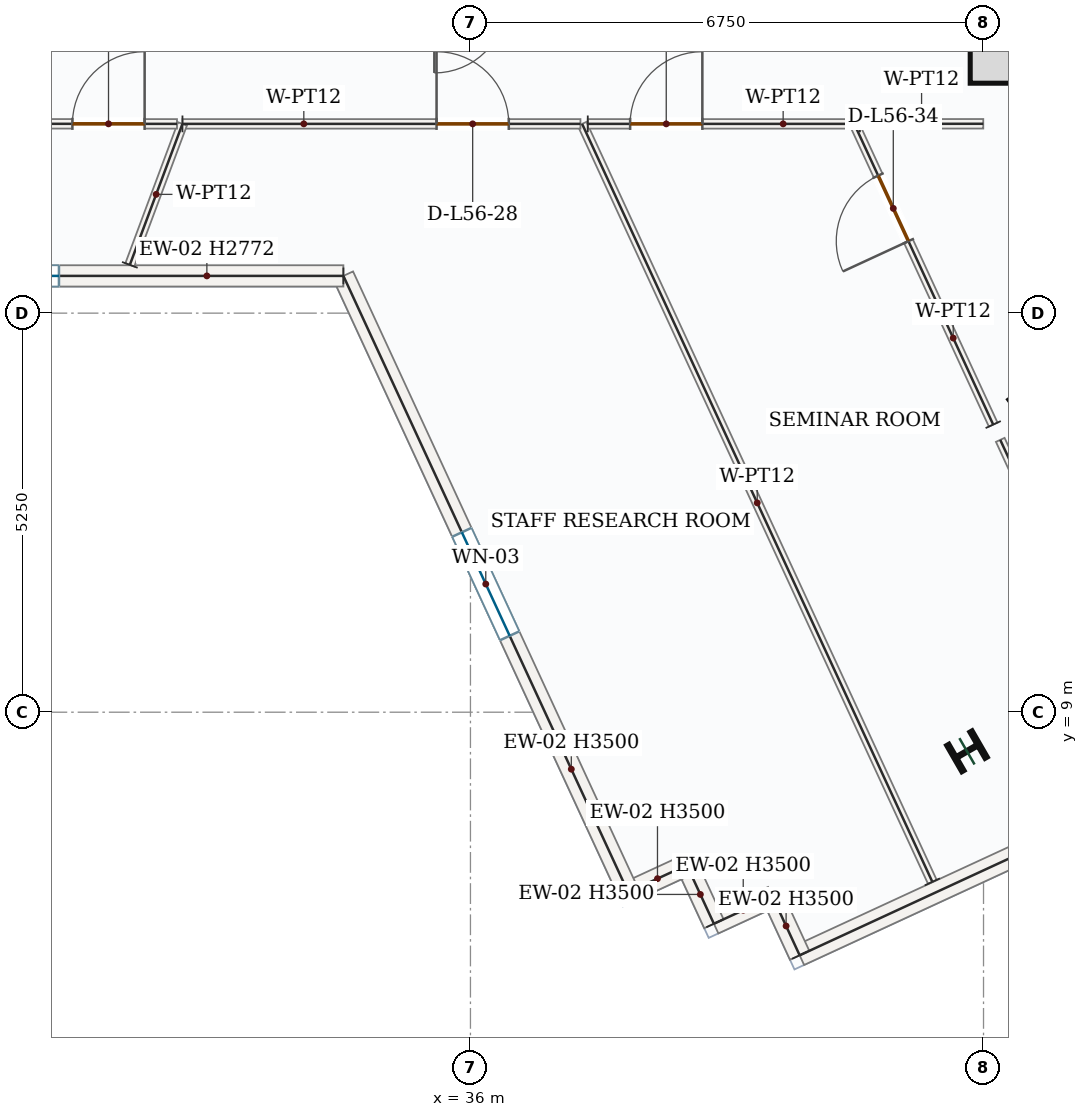
"""IFC4 building model, lengths in metres.
Left out: names, types, materials, properties, quantities, classifications, styles, units other than length and angle.
Written with IfcOpenShell. Run it as: python <this file> out.ifc"""

import sys

from ifc_helpers import new_model, si_unit, direction, frame, frame_2d, origin, origin_2d, place, context, subcontext, project, spatial, rectangle, i_section, extrude, source, transform, mapped, element, fill, save


model = new_model("IFC4")
c1 = context("Model", 3, precision=1e-05, world=origin(), true_north=direction((0.0, 1.0)))
c2 = subcontext(c1, "Body", "Model", "MODEL_VIEW")
j1 = project(units=[si_unit("LENGTHUNIT", "METRE"), si_unit("PLANEANGLEUNIT", "RADIAN")], contexts=[c1])
p1 = place(None, origin())
s1 = spatial("IfcSite", under=j1, at=p1, CompositionType="ELEMENT")
p2 = place(p1, origin())
s2 = spatial("IfcBuilding", under=s1, at=p2, CompositionType="ELEMENT")
p3 = place(p2, frame((0.0, 0.0, 239.1)))
s3 = spatial("IfcBuildingStorey", under=s2, at=p3, CompositionType="ELEMENT", Elevation=239.1)
p4 = place(p3, frame((42.975, 17.4, 0.0), z_axis=(0.0, 0.0, 1.0), x_axis=(0.0, 1.0, 0.0)))
e1 = element("IfcWall", 1, at=p4, inside=s3, PredefinedType="SHEAR", context=c2, shape_type="SweptSolid", body=[
    extrude(rectangle(XDim=8.55, YDim=0.45, at=frame_2d((4.275, 0.0))), origin(), (0.0, 0.0, 1.0), 3.5),
])
p5 = place(p4, frame((6.65, 0.0, 0.0)))
e2 = element("IfcOpeningElement", 2, at=p5, cuts=e1, PredefinedType="OPENING", context=c2, shape_type="SweptSolid", body=[
    extrude(rectangle(XDim=1.1, YDim=2.2, at=frame_2d((0.55, 1.1))), frame((0.0, 0.235, 0.0), z_axis=(0.0, -1.0, 0.0), x_axis=(1.0, 0.0, 0.0)), (0.0, 0.0, 1.0), 0.47),
])
p6 = place(p4, frame((1.75, 0.0, 0.0)))
e3 = element("IfcOpeningElement", 3, at=p6, cuts=e1, PredefinedType="OPENING", context=c2, shape_type="SweptSolid", body=[
    extrude(rectangle(XDim=1.3, YDim=2.2, at=frame_2d((0.65, 1.1))), frame((0.0, 0.235, 0.0), z_axis=(0.0, -1.0, 0.0), x_axis=(1.0, 0.0, 0.0)), (0.0, 0.0, 1.0), 0.47),
])
p7 = place(p4, frame((4.3, 0.0, 0.0)))
e4 = element("IfcOpeningElement", 4, at=p7, cuts=e1, PredefinedType="OPENING", context=c2, shape_type="SweptSolid", body=[
    extrude(rectangle(XDim=0.88, YDim=2.1, at=frame_2d((0.44, 1.05))), frame((0.0, 0.235, 0.0), z_axis=(0.0, -1.0, 0.0), x_axis=(1.0, 0.0, 0.0)), (0.0, 0.0, 1.0), 0.47),
])
m1 = source(origin(), c2, "Body", "SweptSolid", [
    extrude(rectangle(XDim=1.05, YDim=1.05, at=origin_2d()), origin(), (0.0, 0.0, 1.0), 3.75),
])
p8 = place(p3, frame((43.1, 17.8, 0.0), z_axis=(0.0, 0.0, 1.0), x_axis=(1.0, 0.0, 0.0)))
e5 = element("IfcColumn", 5, at=p8, inside=s3, PredefinedType="COLUMN", context=c2, shape_type="MappedRepresentation", body=[
    mapped(m1, transform((0.0, 0.0, 0.0), x_axis=(1.0, 0.0, 0.0), y_axis=(0.0, 1.0, 0.0), z_axis=(0.0, 0.0, 1.0), scale=1.0)),
])
m2 = source(origin(), c2, "Body", "SweptSolid", [
    extrude(i_section(OverallWidth=0.399, OverallDepth=0.386, WebThickness=0.021, FlangeThickness=0.033, FilletRadius=0.018, at=origin_2d()), origin(), (0.0, 0.0, 1.0), 3.75),
])
for number, where, z_axis, x_axis in (
    (6, (43.357, 13.063, 0.0), (0.0, 0.0, 1.0), (-0.588, 0.809, 0.0)),
    (7, (42.532, 8.486, 0.0), (0.0, 0.0, 1.0), (-0.5, 0.866, 0.0)),
):
    element("IfcColumn", number, at=place(p3, frame(where, z_axis=z_axis, x_axis=x_axis)), inside=s3, PredefinedType="COLUMN", context=c2, shape_type="MappedRepresentation", body=[
        mapped(m2, transform((0.0, 0.0, 0.0), x_axis=(1.0, 0.0, 0.0), y_axis=(0.0, 1.0, 0.0), z_axis=(0.0, 0.0, 1.0), scale=1.0)),
    ])
m3 = source(origin(), c2, "Body", "SweptSolid", [
    extrude(rectangle(XDim=9.92, YDim=0.28, at=frame_2d((4.96, 0.0))), origin(), (0.0, 0.0, 1.0), 3.5),
])
p9 = place(p3, frame((49.336, 9.963, 0.0), z_axis=(0.0, 0.0, 1.0), x_axis=(-0.907779940536, -0.419446754143, 0.0)))
e8 = element("IfcWall", 8, at=p9, inside=s3, PredefinedType="SOLIDWALL", context=c2, shape_type="MappedRepresentation", body=[
    mapped(m3, transform((0.0, 0.0, 0.0), x_axis=(1.0, 0.0, 0.0), y_axis=(0.0, 1.0, 0.0), z_axis=(0.0, 0.0, 1.0), scale=1.0)),
])
m4 = source(origin(), c2, "Body", "SweptSolid", [
    extrude(rectangle(XDim=0.85, YDim=0.28, at=frame_2d((0.425, 0.0))), origin(), (0.0, 0.0, 1.0), 3.5),
])
p10 = place(p3, frame((40.331, 5.802, 0.0), z_axis=(0.0, 0.0, 1.0), x_axis=(-0.419422493365, 0.907791150023, 0.0)))
e9 = element("IfcWall", 9, at=p10, inside=s3, PredefinedType="SOLIDWALL", context=c2, shape_type="MappedRepresentation", body=[
    mapped(m4, transform((0.0, 0.0, 0.0), x_axis=(1.0, 0.0, 0.0), y_axis=(0.0, 1.0, 0.0), z_axis=(0.0, 0.0, 1.0), scale=1.0)),
])
m5 = source(origin(), c2, "Body", "SweptSolid", [
    extrude(rectangle(XDim=0.85, YDim=0.28, at=frame_2d((0.425, 0.0))), origin(), (0.0, 0.0, 1.0), 3.5),
])
p11 = place(p3, frame((39.975, 6.573, 0.0), z_axis=(0.0, 0.0, 1.0), x_axis=(-0.907841666427, -0.419313139191, 0.0)))
e10 = element("IfcWall", 10, at=p11, inside=s3, PredefinedType="SOLIDWALL", context=c2, shape_type="MappedRepresentation", body=[
    mapped(m5, transform((0.0, 0.0, 0.0), x_axis=(1.0, 0.0, 0.0), y_axis=(0.0, 1.0, 0.0), z_axis=(0.0, 0.0, 1.0), scale=1.0)),
])
p12 = place(p3, frame((39.203, 6.217, 0.0), z_axis=(0.0, 0.0, 1.0), x_axis=(-0.419422493365, 0.907791150023, 0.0)))
e11 = element("IfcWall", 11, at=p12, inside=s3, PredefinedType="SOLIDWALL", context=c2, shape_type="MappedRepresentation", body=[
    mapped(m4, transform((0.0, 0.0, 0.0), x_axis=(1.0, 0.0, 0.0), y_axis=(0.0, 1.0, 0.0), z_axis=(0.0, 0.0, 1.0), scale=1.0)),
])
p13 = place(p3, frame((38.846, 6.988, 0.0), z_axis=(0.0, 0.0, 1.0), x_axis=(-0.907841666427, -0.419313139191, 0.0)))
e12 = element("IfcWall", 12, at=p13, inside=s3, PredefinedType="SOLIDWALL", context=c2, shape_type="MappedRepresentation", body=[
    mapped(m5, transform((0.0, 0.0, 0.0), x_axis=(1.0, 0.0, 0.0), y_axis=(0.0, 1.0, 0.0), z_axis=(0.0, 0.0, 1.0), scale=1.0)),
])
p14 = place(p3, frame((38.075, 6.632, 0.0), z_axis=(0.0, 0.0, 1.0), x_axis=(-0.419437747849, 0.90778410191, 0.0)))
e13 = element("IfcWall", 13, at=p14, inside=s3, PredefinedType="SOLIDWALL", context=c2, shape_type="SweptSolid", body=[
    extrude(rectangle(XDim=8.932, YDim=0.28, at=frame_2d((4.466, 0.0))), origin(), (0.0, 0.0, 1.0), 3.5),
])
p15 = place(p14, frame((3.716, 0.0, 0.85)))
e14 = element("IfcOpeningElement", 14, at=p15, cuts=e13, PredefinedType="OPENING", context=c2, shape_type="SweptSolid", body=[
    extrude(rectangle(XDim=1.5, YDim=1.5, at=frame_2d((0.75, 0.75))), frame((0.0, 0.15, 0.0), z_axis=(0.0, -1.0, 0.0), x_axis=(1.0, 0.0, 0.0)), (0.0, 0.0, 1.0), 0.3),
])
p16 = place(p3, frame((34.328, 14.74, 0.0), z_axis=(0.0, 0.0, 1.0), x_axis=(-1.0, 0.0, 0.0)))
e15 = element("IfcWall", 15, at=p16, inside=s3, PredefinedType="SOLIDWALL", context=c2, shape_type="SweptSolid", body=[
    extrude(rectangle(XDim=8.984, YDim=0.28, at=frame_2d((4.492, 0.0))), origin(), (0.0, 0.0, 1.0), 2.772),
])
p17 = place(p16, frame((3.742, 0.0, 0.85)))
e16 = element("IfcOpeningElement", 16, at=p17, cuts=e15, PredefinedType="OPENING", context=c2, shape_type="SweptSolid", body=[
    extrude(rectangle(XDim=1.5, YDim=1.5, at=frame_2d((0.75, 0.75))), frame((0.0, 0.15, 0.0), z_axis=(0.0, -1.0, 0.0), x_axis=(1.0, 0.0, 0.0)), (0.0, 0.0, 1.0), 0.3),
])
m6 = source(origin(), c2, "Body", "SweptSolid", [
    extrude(rectangle(XDim=4.904, YDim=0.125, at=frame_2d((2.452, 0.0))), origin(), (0.0, 0.0, 1.0), 3.5),
])
p18 = place(p3, frame((45.027, 8.131, 0.0), z_axis=(0.0, 0.0, 1.0), x_axis=(-0.419459107568, 0.907774232438, 0.0)))
e17 = element("IfcWall", 17, at=p18, inside=s3, PredefinedType="PARTITIONING", context=c2, shape_type="MappedRepresentation", body=[
    mapped(m6, transform((0.0, 0.0, 0.0), x_axis=(1.0, 0.0, 0.0), y_axis=(0.0, 1.0, 0.0), z_axis=(0.0, 0.0, 1.0), scale=1.0)),
])
p19 = place(p3, frame((42.877, 12.784, 0.0), z_axis=(0.0, 0.0, 1.0), x_axis=(-0.419416941906, 0.907793714917, 0.0)))
e18 = element("IfcWall", 18, at=p19, inside=s3, PredefinedType="PARTITIONING", context=c2, shape_type="SweptSolid", body=[
    extrude(rectangle(XDim=4.358, YDim=0.125, at=frame_2d((2.179, 0.0))), origin(), (0.0, 0.0, 1.0), 3.5),
])
p20 = place(p19, frame((2.658, 0.0, 0.0)))
e19 = element("IfcOpeningElement", 19, at=p20, cuts=e18, PredefinedType="OPENING", context=c2, shape_type="SweptSolid", body=[
    extrude(rectangle(XDim=0.95, YDim=2.15, at=frame_2d((0.475, 1.075))), frame((0.0, 0.073, 0.0), z_axis=(0.0, -1.0, 0.0), x_axis=(1.0, 0.0, 0.0)), (0.0, 0.0, 1.0), 0.145),
])
m7 = source(origin(), c2, "Body", "SweptSolid", [
    extrude(rectangle(XDim=1.623, YDim=0.125, at=frame_2d((0.812, 0.0))), origin(), (0.0, 0.0, 1.0), 3.5),
])
p21 = place(p3, frame((41.124, 16.74, 0.0), z_axis=(0.0, 0.0, 1.0), x_axis=(0.999999717168, 0.000752105684, 0.0)))
e20 = element("IfcWall", 20, at=p21, inside=s3, PredefinedType="PARTITIONING", context=c2, shape_type="MappedRepresentation", body=[
    mapped(m7, transform((0.0, 0.0, 0.0), x_axis=(1.0, 0.0, 0.0), y_axis=(0.0, 1.0, 0.0), z_axis=(0.0, 0.0, 1.0), scale=1.0)),
])
m8 = source(origin(), c2, "Body", "SweptSolid", [
    extrude(rectangle(XDim=10.985, YDim=0.125, at=frame_2d((5.492, 0.0))), origin(), (0.0, 0.0, 1.0), 3.5),
])
p22 = place(p3, frame((42.077, 6.768, 0.0), z_axis=(0.0, 0.0, 1.0), x_axis=(-0.41945135704, 0.907777813717, 0.0)))
e21 = element("IfcWall", 21, at=p22, inside=s3, PredefinedType="PARTITIONING", context=c2, shape_type="MappedRepresentation", body=[
    mapped(m8, transform((0.0, 0.0, 0.0), x_axis=(1.0, 0.0, 0.0), y_axis=(0.0, 1.0, 0.0), z_axis=(0.0, 0.0, 1.0), scale=1.0)),
])
p23 = place(p3, frame((37.543, 16.74, 0.0), z_axis=(0.0, 0.0, 1.0), x_axis=(1.0, 0.0, 0.0)))
e22 = element("IfcWall", 22, at=p23, inside=s3, PredefinedType="PARTITIONING", context=c2, shape_type="SweptSolid", body=[
    extrude(rectangle(XDim=3.484, YDim=0.125, at=frame_2d((1.742, 0.0))), origin(), (0.0, 0.0, 1.0), 3.5),
])
p24 = place(p23, frame((0.557, 0.0, 0.0)))
e23 = element("IfcOpeningElement", 23, at=p24, cuts=e22, PredefinedType="OPENING", context=c2, shape_type="SweptSolid", body=[
    extrude(rectangle(XDim=0.95, YDim=2.15, at=frame_2d((0.475, 1.075))), frame((0.0, 0.073, 0.0), z_axis=(0.0, -1.0, 0.0), x_axis=(1.0, 0.0, 0.0)), (0.0, 0.0, 1.0), 0.145),
])
p25 = place(p3, frame((32.211, 16.74, 0.0), z_axis=(0.0, 0.0, 1.0), x_axis=(1.0, 0.0, 0.0)))
e24 = element("IfcWall", 24, at=p25, inside=s3, PredefinedType="PARTITIONING", context=c2, shape_type="SweptSolid", body=[
    extrude(rectangle(XDim=5.236, YDim=0.125, at=frame_2d((2.618, 0.0))), origin(), (0.0, 0.0, 1.0), 3.5),
])
p26 = place(p25, frame((3.343, 0.0, 0.0)))
e25 = element("IfcOpeningElement", 25, at=p26, cuts=e24, PredefinedType="OPENING", context=c2, shape_type="SweptSolid", body=[
    extrude(rectangle(XDim=0.95, YDim=2.15, at=frame_2d((0.475, 1.075))), frame((0.0, 0.073, 0.0), z_axis=(0.0, -1.0, 0.0), x_axis=(1.0, 0.0, 0.0)), (0.0, 0.0, 1.0), 0.145),
])
m9 = source(origin(), c2, "Body", "SweptSolid", [
    extrude(rectangle(XDim=1.98, YDim=0.125, at=frame_2d((0.99, 0.0))), origin(), (0.0, 0.0, 1.0), 3.5),
])
p27 = place(p3, frame((31.519, 14.885, 0.0), z_axis=(0.0, 0.0, 1.0), x_axis=(0.349690675255, 0.9368652153, 0.0)))
e26 = element("IfcWall", 26, at=p27, inside=s3, PredefinedType="PARTITIONING", context=c2, shape_type="MappedRepresentation", body=[
    mapped(m9, transform((0.0, 0.0, 0.0), x_axis=(1.0, 0.0, 0.0), y_axis=(0.0, 1.0, 0.0), z_axis=(0.0, 0.0, 1.0), scale=1.0)),
])
p28 = place(p3, frame((29.253, 16.741, 0.0), z_axis=(0.0, 0.0, 1.0), x_axis=(0.999999910531, -0.000423011806, 0.0)))
e27 = element("IfcWall", 27, at=p28, inside=s3, PredefinedType="PARTITIONING", context=c2, shape_type="SweptSolid", body=[
    extrude(rectangle(XDim=2.886, YDim=0.125, at=frame_2d((1.443, 0.0))), origin(), (0.0, 0.0, 1.0), 3.5),
])
p29 = place(p28, frame((1.51, 0.0, 0.0)))
e28 = element("IfcOpeningElement", 28, at=p29, cuts=e27, PredefinedType="OPENING", context=c2, shape_type="SweptSolid", body=[
    extrude(rectangle(XDim=0.95, YDim=2.15, at=frame_2d((0.475, 1.075))), frame((0.0, 0.073, 0.0), z_axis=(0.0, -1.0, 0.0), x_axis=(1.0, 0.0, 0.0)), (0.0, 0.0, 1.0), 0.145),
])
m10 = source(origin(), c2, "Body", "SweptSolid", [
    extrude(rectangle(XDim=1.5, YDim=1.5, at=frame_2d((0.75, 0.75))), frame((0.0, 0.03, 0.0), z_axis=(0.0, -1.0, 0.0), x_axis=(1.0, 0.0, 0.0)), (0.0, 0.0, 1.0), 0.06),
])
p30 = place(p15, origin())
e29 = element("IfcWindow", 29, at=p30, inside=s3, PartitioningType="SINGLE_PANEL", PredefinedType="WINDOW", context=c2, shape_type="MappedRepresentation", body=[
    mapped(m10, transform((0.0, 0.0, 0.0), x_axis=(1.0, 0.0, 0.0), y_axis=(0.0, 1.0, 0.0), z_axis=(0.0, 0.0, 1.0), scale=1.0)),
])
fill(e14, e29)
p31 = place(p17, origin())
e30 = element("IfcWindow", 30, at=p31, inside=s3, PartitioningType="SINGLE_PANEL", PredefinedType="WINDOW", context=c2, shape_type="MappedRepresentation", body=[
    mapped(m10, transform((0.0, 0.0, 0.0), x_axis=(1.0, 0.0, 0.0), y_axis=(0.0, 1.0, 0.0), z_axis=(0.0, 0.0, 1.0), scale=1.0)),
])
fill(e16, e30)
m11 = source(origin(), c2, "Body", "SweptSolid", [
    extrude(rectangle(XDim=0.95, YDim=2.15, at=frame_2d((0.475, 1.075))), frame((0.0, 0.025, 0.0), z_axis=(0.0, -1.0, 0.0), x_axis=(1.0, 0.0, 0.0)), (0.0, 0.0, 1.0), 0.05),
])
p32 = place(p29, origin())
e31 = element("IfcDoor", 31, at=p32, inside=s3, OperationType="SINGLE_SWING_RIGHT", PredefinedType="DOOR", context=c2, shape_type="MappedRepresentation", body=[
    mapped(m11, transform((0.0, 0.0, 0.0), x_axis=(1.0, 0.0, 0.0), y_axis=(0.0, 1.0, 0.0), z_axis=(0.0, 0.0, 1.0), scale=1.0)),
])
fill(e28, e31)
p33 = place(p26, origin())
e32 = element("IfcDoor", 32, at=p33, inside=s3, OperationType="SINGLE_SWING_LEFT", PredefinedType="DOOR", context=c2, shape_type="MappedRepresentation", body=[
    mapped(m11, transform((0.0, 0.0, 0.0), x_axis=(1.0, 0.0, 0.0), y_axis=(0.0, 1.0, 0.0), z_axis=(0.0, 0.0, 1.0), scale=1.0)),
])
fill(e25, e32)
p34 = place(p24, origin())
e33 = element("IfcDoor", 33, at=p34, inside=s3, OperationType="SINGLE_SWING_RIGHT", PredefinedType="DOOR", context=c2, shape_type="MappedRepresentation", body=[
    mapped(m11, transform((0.0, 0.0, 0.0), x_axis=(1.0, 0.0, 0.0), y_axis=(0.0, 1.0, 0.0), z_axis=(0.0, 0.0, 1.0), scale=1.0)),
])
fill(e23, e33)
p35 = place(p20, origin())
e34 = element("IfcDoor", 34, at=p35, inside=s3, OperationType="SINGLE_SWING_LEFT", PredefinedType="DOOR", context=c2, shape_type="MappedRepresentation", body=[
    mapped(m11, transform((0.0, 0.0, 0.0), x_axis=(1.0, 0.0, 0.0), y_axis=(0.0, 1.0, 0.0), z_axis=(0.0, 0.0, 1.0), scale=1.0)),
])
fill(e19, e34)
save(model, sys.argv[1])
